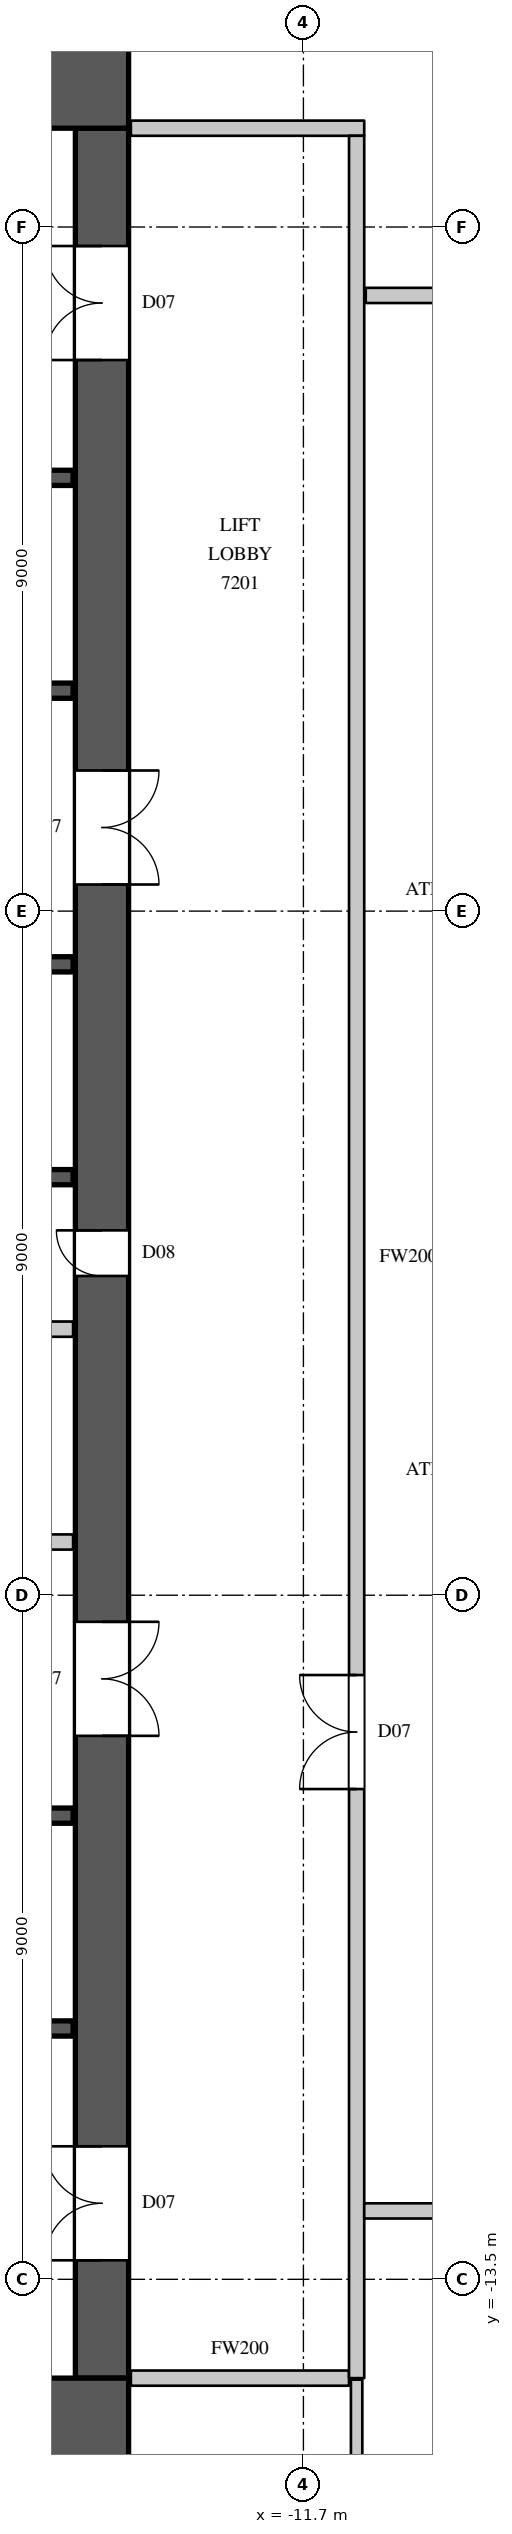
"""IFC4 building model, lengths in metres.
Left out: names, types, materials, properties, quantities, classifications, styles, units other than length and angle.
Written with IfcOpenShell. Run it as: python <this file> out.ifc"""

import sys

from ifc_helpers import new_model, si_unit, direction, frame, frame_2d, origin, place, context, subcontext, project, spatial, rectangle, extrude, element, fill, save


model = new_model("IFC4")
c1 = context("Model", 3, precision=1e-05, world=origin(), true_north=direction((0.0, 1.0)))
c2 = subcontext(c1, "Body", "Model", "MODEL_VIEW")
j1 = project(units=[si_unit("LENGTHUNIT", "METRE"), si_unit("PLANEANGLEUNIT", "RADIAN")], contexts=[c1])
p1 = place(None, origin())
s1 = spatial("IfcSite", under=j1, at=p1, CompositionType="ELEMENT")
p2 = place(p1, origin())
s2 = spatial("IfcBuilding", under=s1, at=p2, CompositionType="ELEMENT")
p3 = place(p2, frame((0.0, 0.0, 317.2)))
s3 = spatial("IfcBuildingStorey", under=s2, at=p3, CompositionType="ELEMENT", Elevation=317.2)
for number, where, z_axis, x_axis in (
    (1, (-30.0, 15.4, 0.0), (0.0, 0.0, 1.0), (1.0, 0.0, 0.0)),
    (2, (-30.0, -15.4, 0.0), (0.0, 0.0, 1.0), (1.0, 0.0, 0.0)),
):
    element("IfcWall", number, at=place(p3, frame(where, z_axis=z_axis, x_axis=x_axis)), inside=s3, PredefinedType="SHEAR", context=c2, shape_type="SweptSolid", body=[
        extrude(rectangle(XDim=16.0, YDim=1.2, at=frame_2d((8.0, 0.0))), origin(), (0.0, 0.0, 1.0), 4.1),
    ])
p4 = place(p3, frame((-14.35, -14.8, 0.0), z_axis=(0.0, 0.0, 1.0), x_axis=(0.0, 1.0, 0.0)))
e3 = element("IfcWall", 3, at=p4, inside=s3, PredefinedType="SHEAR", context=c2, shape_type="SweptSolid", body=[
    extrude(rectangle(XDim=29.6, YDim=0.7, at=frame_2d((14.8, 0.0))), origin(), (0.0, 0.0, 1.0), 4.1),
])
p5 = place(p4, frame((1.55, 0.0, 0.0)))
e4 = element("IfcOpeningElement", 4, at=p5, cuts=e3, PredefinedType="OPENING", context=c2, shape_type="SweptSolid", body=[
    extrude(rectangle(XDim=1.5, YDim=2.4, at=frame_2d((0.75, 1.2))), frame((0.0, 0.36, 0.0), z_axis=(0.0, -1.0, 0.0), x_axis=(1.0, 0.0, 0.0)), (0.0, 0.0, 1.0), 0.72),
])
p6 = place(p4, frame((26.55, 0.0, 0.0)))
e5 = element("IfcOpeningElement", 5, at=p6, cuts=e3, PredefinedType="OPENING", context=c2, shape_type="SweptSolid", body=[
    extrude(rectangle(XDim=1.5, YDim=2.4, at=frame_2d((0.75, 1.2))), frame((0.0, 0.36, 0.0), z_axis=(0.0, -1.0, 0.0), x_axis=(1.0, 0.0, 0.0)), (0.0, 0.0, 1.0), 0.72),
])
p7 = place(p4, frame((8.45, 0.0, 0.0)))
e6 = element("IfcOpeningElement", 6, at=p7, cuts=e3, PredefinedType="OPENING", context=c2, shape_type="SweptSolid", body=[
    extrude(rectangle(XDim=1.5, YDim=2.4, at=frame_2d((0.75, 1.2))), frame((0.0, 0.36, 0.0), z_axis=(0.0, -1.0, 0.0), x_axis=(1.0, 0.0, 0.0)), (0.0, 0.0, 1.0), 0.72),
])
p8 = place(p4, frame((19.65, 0.0, 0.0)))
e7 = element("IfcOpeningElement", 7, at=p8, cuts=e3, PredefinedType="OPENING", context=c2, shape_type="SweptSolid", body=[
    extrude(rectangle(XDim=1.5, YDim=2.4, at=frame_2d((0.75, 1.2))), frame((0.0, 0.36, 0.0), z_axis=(0.0, -1.0, 0.0), x_axis=(1.0, 0.0, 0.0)), (0.0, 0.0, 1.0), 0.72),
])
p9 = place(p4, frame((14.5, 0.0, 0.0)))
e8 = element("IfcOpeningElement", 8, at=p9, cuts=e3, PredefinedType="OPENING", context=c2, shape_type="SweptSolid", body=[
    extrude(rectangle(XDim=0.6, YDim=2.0, at=frame_2d((0.3, 1.0))), frame((0.0, 0.36, 0.0), z_axis=(0.0, -1.0, 0.0), x_axis=(1.0, 0.0, 0.0)), (0.0, 0.0, 1.0), 0.72),
])
p10 = place(p3, frame((-17.78, -3.8, 0.0), z_axis=(0.0, 0.0, 1.0), x_axis=(1.0, 0.0, 0.0)))
e9 = element("IfcWall", 9, at=p10, inside=s3, PredefinedType="PARTITIONING", context=c2, shape_type="SweptSolid", body=[
    extrude(rectangle(XDim=3.05, YDim=0.2, at=frame_2d((1.525, 0.0))), origin(), (0.0, 0.0, 1.0), 3.8),
])
p11 = place(p10, frame((1.05, 0.0, 0.0)))
e10 = element("IfcOpeningElement", 10, at=p11, cuts=e9, PredefinedType="OPENING", context=c2, shape_type="SweptSolid", body=[
    extrude(rectangle(XDim=0.9, YDim=2.2, at=frame_2d((0.45, 1.1))), frame((0.0, 0.11, 0.0), z_axis=(0.0, -1.0, 0.0), x_axis=(1.0, 0.0, 0.0)), (0.0, 0.0, 1.0), 0.22),
])
p12 = place(p3, frame((-13.97, -14.8, 0.0), z_axis=(0.0, 0.0, 1.0), x_axis=(1.0, 0.0, 0.0)))
e11 = element("IfcWall", 11, at=p12, inside=s3, PredefinedType="PARTITIONING", context=c2, shape_type="SweptSolid", body=[
    extrude(rectangle(XDim=2.87, YDim=0.2, at=frame_2d((1.435, 0.0))), origin(), (0.0, 0.0, 1.0), 3.8),
])
p13 = place(p3, frame((-13.97, 14.8, 0.0), z_axis=(0.0, 0.0, 1.0), x_axis=(1.0, 0.0, 0.0)))
e12 = element("IfcWall", 12, at=p13, inside=s3, PredefinedType="PARTITIONING", context=c2, shape_type="SweptSolid", body=[
    extrude(rectangle(XDim=3.07, YDim=0.2, at=frame_2d((1.535, 0.0))), origin(), (0.0, 0.0, 1.0), 3.8),
])
p14 = place(p3, frame((-11.0, -14.8, 0.0), z_axis=(0.0, 0.0, 1.0), x_axis=(0.0, 1.0, 0.0)))
e13 = element("IfcWall", 13, at=p14, inside=s3, PredefinedType="PARTITIONING", context=c2, shape_type="SweptSolid", body=[
    extrude(rectangle(XDim=29.5, YDim=0.2, at=frame_2d((14.75, 0.0))), origin(), (0.0, 0.0, 1.0), 3.8),
])
p15 = place(p14, frame((7.75, 0.0, 0.0)))
e14 = element("IfcOpeningElement", 14, at=p15, cuts=e13, PredefinedType="OPENING", context=c2, shape_type="SweptSolid", body=[
    extrude(rectangle(XDim=1.5, YDim=2.4, at=frame_2d((0.75, 1.2))), frame((0.0, 0.11, 0.0), z_axis=(0.0, -1.0, 0.0), x_axis=(1.0, 0.0, 0.0)), (0.0, 0.0, 1.0), 0.22),
])
p16 = place(p3, frame((-10.9, -12.6, 0.0), z_axis=(0.0, 0.0, 1.0), x_axis=(1.0, 0.0, 0.0)))
e15 = element("IfcWall", 15, at=p16, inside=s3, PredefinedType="PARTITIONING", context=c2, shape_type="SweptSolid", body=[
    extrude(rectangle(XDim=22.6, YDim=0.2, at=frame_2d((11.3, 0.0))), origin(), (0.0, 0.0, 1.0), 3.8),
])
p17 = place(p16, frame((14.1, 0.0, 0.0)))
e16 = element("IfcOpeningElement", 16, at=p17, cuts=e15, PredefinedType="OPENING", context=c2, shape_type="SweptSolid", body=[
    extrude(rectangle(XDim=0.9, YDim=2.2, at=frame_2d((0.45, 1.1))), frame((0.0, 0.11, 0.0), z_axis=(0.0, -1.0, 0.0), x_axis=(1.0, 0.0, 0.0)), (0.0, 0.0, 1.0), 0.22),
])
p18 = place(p16, frame((17.4, 0.0, 0.0)))
e17 = element("IfcOpeningElement", 17, at=p18, cuts=e15, PredefinedType="OPENING", context=c2, shape_type="SweptSolid", body=[
    extrude(rectangle(XDim=0.9, YDim=2.2, at=frame_2d((0.45, 1.1))), frame((0.0, 0.11, 0.0), z_axis=(0.0, -1.0, 0.0), x_axis=(1.0, 0.0, 0.0)), (0.0, 0.0, 1.0), 0.22),
])
p19 = place(p16, frame((20.25, 0.0, 0.0)))
e18 = element("IfcOpeningElement", 18, at=p19, cuts=e15, PredefinedType="OPENING", context=c2, shape_type="SweptSolid", body=[
    extrude(rectangle(XDim=0.9, YDim=2.2, at=frame_2d((0.45, 1.1))), frame((0.0, 0.11, 0.0), z_axis=(0.0, -1.0, 0.0), x_axis=(1.0, 0.0, 0.0)), (0.0, 0.0, 1.0), 0.22),
])
p20 = place(p16, frame((1.95, 0.0, 0.0)))
e19 = element("IfcOpeningElement", 19, at=p20, cuts=e15, PredefinedType="OPENING", context=c2, shape_type="SweptSolid", body=[
    extrude(rectangle(XDim=1.1, YDim=2.4, at=frame_2d((0.55, 1.2))), frame((0.0, 0.11, 0.0), z_axis=(0.0, -1.0, 0.0), x_axis=(1.0, 0.0, 0.0)), (0.0, 0.0, 1.0), 0.22),
])
p21 = place(p16, frame((9.95, 0.0, 0.0)))
e20 = element("IfcOpeningElement", 20, at=p21, cuts=e15, PredefinedType="OPENING", context=c2, shape_type="SweptSolid", body=[
    extrude(rectangle(XDim=1.1, YDim=2.4, at=frame_2d((0.55, 1.2))), frame((0.0, 0.11, 0.0), z_axis=(0.0, -1.0, 0.0), x_axis=(1.0, 0.0, 0.0)), (0.0, 0.0, 1.0), 0.22),
])
p22 = place(p3, frame((-10.88, 12.6, 0.0), z_axis=(0.0, 0.0, 1.0), x_axis=(1.0, 0.0, 0.0)))
e21 = element("IfcWall", 21, at=p22, inside=s3, PredefinedType="PARTITIONING", context=c2, shape_type="SweptSolid", body=[
    extrude(rectangle(XDim=4.08, YDim=0.2, at=frame_2d((2.04, 0.0))), origin(), (0.0, 0.0, 1.0), 3.8),
])
p23 = place(p3, frame((-11.0, -23.757, 0.0), z_axis=(0.0, 0.0, 1.0), x_axis=(0.0, 1.0, 0.0)))
e22 = element("IfcWall", 22, at=p23, inside=s3, PredefinedType="PARTITIONING", context=c2, shape_type="SweptSolid", body=[
    extrude(rectangle(XDim=8.937, YDim=0.15, at=frame_2d((4.468, 0.0))), origin(), (0.0, 0.0, 1.0), 3.8),
])
p24 = place(p3, frame((-29.27, -1.0, 0.0), z_axis=(0.0, 0.0, 1.0), x_axis=(1.0, 0.0, 0.0)))
e23 = element("IfcWall", 23, at=p24, inside=s3, PredefinedType="PARTITIONING", context=c2, shape_type="SweptSolid", body=[
    extrude(rectangle(XDim=14.54, YDim=0.2, at=frame_2d((7.27, 0.0))), origin(), (0.0, 0.0, 1.0), 3.8),
])
p25 = place(p3, frame((-17.92, -10.2, 0.0), z_axis=(0.0, 0.0, 1.0), x_axis=(1.0, 0.0, 0.0)))
e24 = element("IfcWall", 24, at=p25, inside=s3, PredefinedType="SHEAR", context=c2, shape_type="SweptSolid", body=[
    extrude(rectangle(XDim=3.19, YDim=0.2, at=frame_2d((1.595, 0.0))), origin(), (0.0, 0.0, 1.0), 3.8),
])
p26 = place(p25, frame((1.05, 0.0, 0.0)))
e25 = element("IfcOpeningElement", 25, at=p26, cuts=e24, PredefinedType="OPENING", context=c2, shape_type="SweptSolid", body=[
    extrude(rectangle(XDim=1.1, YDim=2.2, at=frame_2d((0.55, 1.1))), frame((0.0, 0.11, 0.0), z_axis=(0.0, -1.0, 0.0), x_axis=(1.0, 0.0, 0.0)), (0.0, 0.0, 1.0), 0.22),
])
for number, where, z_axis, x_axis in (
    (26, (-17.9, -7.4, 0.0), (0.0, 0.0, 1.0), (1.0, 0.0, 0.0)),
    (27, (-17.9, 1.0, 0.0), (0.0, 0.0, 1.0), (1.0, 0.0, 0.0)),
):
    element("IfcWall", number, at=place(p3, frame(where, z_axis=z_axis, x_axis=x_axis)), inside=s3, PredefinedType="SHEAR", context=c2, shape_type="SweptSolid", body=[
        extrude(rectangle(XDim=3.17, YDim=0.2, at=frame_2d((1.585, 0.0))), origin(), (0.0, 0.0, 1.0), 3.8),
    ])
p27 = place(p3, frame((-17.9, 3.8, 0.0), z_axis=(0.0, 0.0, 1.0), x_axis=(1.0, 0.0, 0.0)))
e28 = element("IfcWall", 28, at=p27, inside=s3, PredefinedType="SHEAR", context=c2, shape_type="SweptSolid", body=[
    extrude(rectangle(XDim=3.17, YDim=0.2, at=frame_2d((1.585, 0.0))), origin(), (0.0, 0.0, 1.0), 3.8),
])
p28 = place(p27, frame((1.05, 0.0, 0.0)))
e29 = element("IfcOpeningElement", 29, at=p28, cuts=e28, PredefinedType="OPENING", context=c2, shape_type="SweptSolid", body=[
    extrude(rectangle(XDim=1.1, YDim=2.2, at=frame_2d((0.55, 1.1))), frame((0.0, 0.11, 0.0), z_axis=(0.0, -1.0, 0.0), x_axis=(1.0, 0.0, 0.0)), (0.0, 0.0, 1.0), 0.22),
])
p29 = place(p3, frame((-17.92, 7.4, 0.0), z_axis=(0.0, 0.0, 1.0), x_axis=(1.0, 0.0, 0.0)))
e30 = element("IfcWall", 30, at=p29, inside=s3, PredefinedType="SHEAR", context=c2, shape_type="SweptSolid", body=[
    extrude(rectangle(XDim=3.19, YDim=0.2, at=frame_2d((1.595, 0.0))), origin(), (0.0, 0.0, 1.0), 3.8),
])
p30 = place(p3, frame((-17.92, 10.2, 0.0), z_axis=(0.0, 0.0, 1.0), x_axis=(1.0, 0.0, 0.0)))
e31 = element("IfcWall", 31, at=p30, inside=s3, PredefinedType="SHEAR", context=c2, shape_type="SweptSolid", body=[
    extrude(rectangle(XDim=3.19, YDim=0.2, at=frame_2d((1.595, 0.0))), origin(), (0.0, 0.0, 1.0), 3.8),
])
p31 = place(p30, frame((1.05, 0.0, 0.0)))
e32 = element("IfcOpeningElement", 32, at=p31, cuts=e31, PredefinedType="OPENING", context=c2, shape_type="SweptSolid", body=[
    extrude(rectangle(XDim=1.1, YDim=2.2, at=frame_2d((0.55, 1.1))), frame((0.0, 0.11, 0.0), z_axis=(0.0, -1.0, 0.0), x_axis=(1.0, 0.0, 0.0)), (0.0, 0.0, 1.0), 0.22),
])
p32 = place(p15, origin())
e33 = element("IfcDoor", 33, at=p32, inside=s3, OperationType="DOUBLE_DOOR_SINGLE_SWING", PredefinedType="DOOR", context=c2, shape_type="SweptSolid", body=[
    extrude(rectangle(XDim=1.5, YDim=2.4, at=frame_2d((0.75, 1.2))), frame((0.0, 0.025, 0.0), z_axis=(0.0, -1.0, 0.0), x_axis=(1.0, 0.0, 0.0)), (0.0, 0.0, 1.0), 0.05),
])
fill(e14, e33)
p33 = place(p5, origin())
e34 = element("IfcDoor", 34, at=p33, inside=s3, OperationType="DOUBLE_DOOR_SINGLE_SWING", PredefinedType="DOOR", context=c2, shape_type="SweptSolid", body=[
    extrude(rectangle(XDim=1.5, YDim=2.4, at=frame_2d((0.75, 1.2))), frame((0.0, 0.345, 0.0), z_axis=(0.0, -1.0, 0.0), x_axis=(1.0, 0.0, 0.0)), (0.0, 0.0, 1.0), 0.05),
])
fill(e4, e34)
p34 = place(p6, origin())
e35 = element("IfcDoor", 35, at=p34, inside=s3, OperationType="DOUBLE_DOOR_SINGLE_SWING", PredefinedType="DOOR", context=c2, shape_type="SweptSolid", body=[
    extrude(rectangle(XDim=1.5, YDim=2.4, at=frame_2d((0.75, 1.2))), frame((0.0, 0.345, 0.0), z_axis=(0.0, -1.0, 0.0), x_axis=(1.0, 0.0, 0.0)), (0.0, 0.0, 1.0), 0.05),
])
fill(e5, e35)
p35 = place(p7, origin())
e36 = element("IfcDoor", 36, at=p35, inside=s3, OperationType="DOUBLE_DOOR_SINGLE_SWING", PredefinedType="DOOR", context=c2, shape_type="SweptSolid", body=[
    extrude(rectangle(XDim=1.5, YDim=2.4, at=frame_2d((0.75, 1.2))), frame((0.0, -0.295, 0.0), z_axis=(0.0, -1.0, 0.0), x_axis=(1.0, 0.0, 0.0)), (0.0, 0.0, 1.0), 0.05),
])
fill(e6, e36)
p36 = place(p8, origin())
e37 = element("IfcDoor", 37, at=p36, inside=s3, OperationType="DOUBLE_DOOR_SINGLE_SWING", PredefinedType="DOOR", context=c2, shape_type="SweptSolid", body=[
    extrude(rectangle(XDim=1.5, YDim=2.4, at=frame_2d((0.75, 1.2))), frame((0.0, -0.295, 0.0), z_axis=(0.0, -1.0, 0.0), x_axis=(1.0, 0.0, 0.0)), (0.0, 0.0, 1.0), 0.05),
])
fill(e7, e37)
p37 = place(p9, origin())
e38 = element("IfcDoor", 38, at=p37, inside=s3, OperationType="SINGLE_SWING_RIGHT", PredefinedType="DOOR", context=c2, shape_type="SweptSolid", body=[
    extrude(rectangle(XDim=0.6, YDim=2.0, at=frame_2d((0.3, 1.0))), frame((0.0, 0.345, 0.0), z_axis=(0.0, -1.0, 0.0), x_axis=(1.0, 0.0, 0.0)), (0.0, 0.0, 1.0), 0.05),
])
fill(e8, e38)
save(model, sys.argv[1])
